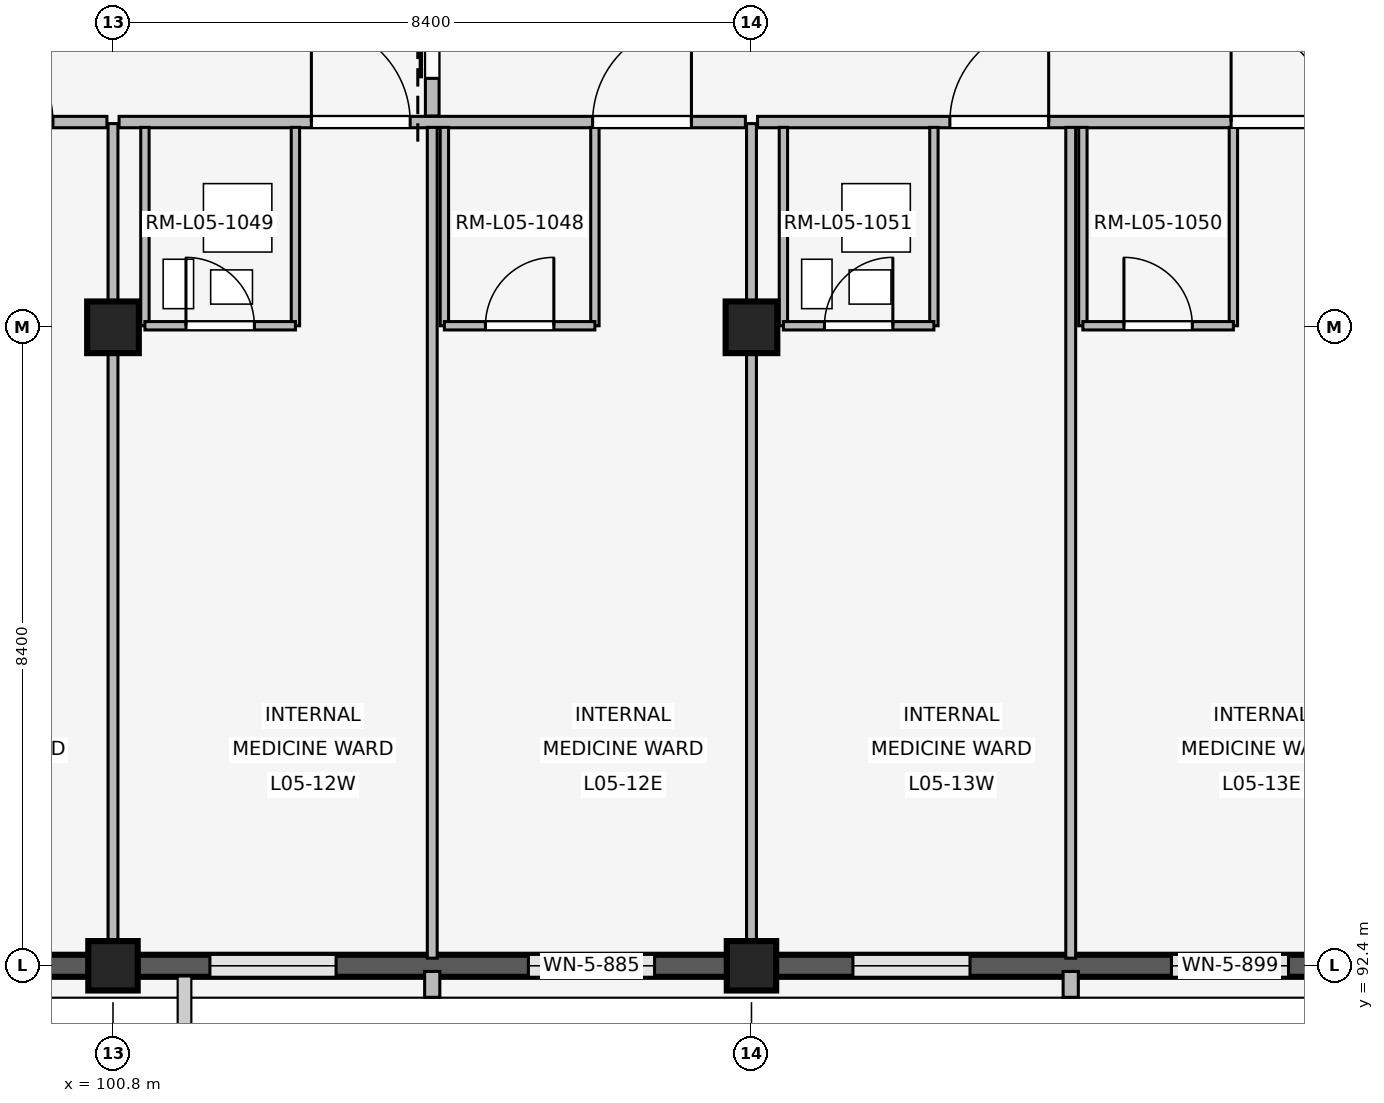
"""IFC4 building model, lengths in metres.
Left out: names, types, materials, properties, quantities, classifications, styles, units other than length and angle.
Written with IfcOpenShell. Run it as: python <this file> out.ifc"""

import sys

from ifc_helpers import new_model, si_unit, direction, frame, frame_2d, origin, origin_2d, place, context, subcontext, project, spatial, rectangle, extrude, element, fill, save


model = new_model("IFC4")
c1 = context("Model", 3, precision=1e-05, world=origin(), true_north=direction((0.0, 1.0)))
c2 = subcontext(c1, "Body", "Model", "MODEL_VIEW")
j1 = project(units=[si_unit("LENGTHUNIT", "METRE"), si_unit("PLANEANGLEUNIT", "RADIAN")], contexts=[c1])
p1 = place(None, origin())
s1 = spatial("IfcSite", under=j1, at=p1, CompositionType="ELEMENT")
p2 = place(p1, origin())
s2 = spatial("IfcBuilding", under=s1, at=p2, CompositionType="ELEMENT")
p3 = place(p2, frame((0.0, 0.0, 20.4)))
s3 = spatial("IfcBuildingStorey", under=s2, at=p3, CompositionType="ELEMENT", Elevation=20.4)
p4 = place(p3, frame((100.8, 92.4, 0.0), z_axis=(0.0, 0.0, 1.0), x_axis=(1.0, 0.0, 0.0)))
e1 = element("IfcColumn", 1, at=p4, inside=s3, PredefinedType="COLUMN", context=c2, shape_type="SweptSolid", body=[
    extrude(rectangle(XDim=0.65, YDim=0.65, at=origin_2d()), origin(), (0.0, 0.0, 1.0), 4.2),
])
p5 = place(p3, frame((100.8, 100.8, 0.0), z_axis=(0.0, 0.0, 1.0), x_axis=(1.0, 0.0, 0.0)))
e2 = element("IfcColumn", 2, at=p5, inside=s3, PredefinedType="COLUMN", context=c2, shape_type="SweptSolid", body=[
    extrude(rectangle(XDim=0.68, YDim=0.68, at=origin_2d()), origin(), (0.0, 0.0, 1.0), 4.2),
])
p6 = place(p3, frame((109.2, 92.4, 0.0), z_axis=(0.0, 0.0, 1.0), x_axis=(1.0, 0.0, 0.0)))
e3 = element("IfcColumn", 3, at=p6, inside=s3, PredefinedType="COLUMN", context=c2, shape_type="SweptSolid", body=[
    extrude(rectangle(XDim=0.65, YDim=0.65, at=origin_2d()), origin(), (0.0, 0.0, 1.0), 4.2),
])
p7 = place(p3, frame((109.2, 100.8, 0.0), z_axis=(0.0, 0.0, 1.0), x_axis=(1.0, 0.0, 0.0)))
e4 = element("IfcColumn", 4, at=p7, inside=s3, PredefinedType="COLUMN", context=c2, shape_type="SweptSolid", body=[
    extrude(rectangle(XDim=0.68, YDim=0.68, at=origin_2d()), origin(), (0.0, 0.0, 1.0), 4.2),
])
p8 = place(p3, frame((100.48, 92.4, 0.0), z_axis=(0.0, 0.0, 1.0), x_axis=(-1.0, 0.0, 0.0)))
e5 = element("IfcWall", 5, at=p8, inside=s3, PredefinedType="SOLIDWALL", context=c2, shape_type="SweptSolid", body=[
    extrude(rectangle(XDim=7.76, YDim=0.29, at=frame_2d((3.88, 0.0))), origin(), (0.0, 0.0, 1.0), 3.34),
])
p9 = place(p8, frame((1.075, 0.0, 0.85)))
e6 = element("IfcOpeningElement", 6, at=p9, cuts=e5, PredefinedType="OPENING", context=c2, shape_type="SweptSolid", body=[
    extrude(rectangle(XDim=1.42, YDim=1.45, at=frame_2d((0.71, 0.725))), frame((0.0, 0.155, 0.0), z_axis=(0.0, -1.0, 0.0), x_axis=(1.0, 0.0, 0.0)), (0.0, 0.0, 1.0), 0.31),
])
p10 = place(p8, frame((5.265, 0.0, 0.85)))
e7 = element("IfcOpeningElement", 7, at=p10, cuts=e5, PredefinedType="OPENING", context=c2, shape_type="SweptSolid", body=[
    extrude(rectangle(XDim=1.42, YDim=1.45, at=frame_2d((0.71, 0.725))), frame((0.0, 0.155, 0.0), z_axis=(0.0, -1.0, 0.0), x_axis=(1.0, 0.0, 0.0)), (0.0, 0.0, 1.0), 0.31),
])
p11 = place(p3, frame((108.88, 92.4, 0.0), z_axis=(0.0, 0.0, 1.0), x_axis=(-1.0, 0.0, 0.0)))
e8 = element("IfcWall", 8, at=p11, inside=s3, PredefinedType="SOLIDWALL", context=c2, shape_type="SweptSolid", body=[
    extrude(rectangle(XDim=7.76, YDim=0.29, at=frame_2d((3.88, 0.0))), origin(), (0.0, 0.0, 1.0), 3.34),
])
p12 = place(p11, frame((0.955, 0.0, 0.85)))
e9 = element("IfcOpeningElement", 9, at=p12, cuts=e8, PredefinedType="OPENING", context=c2, shape_type="SweptSolid", body=[
    extrude(rectangle(XDim=1.66, YDim=1.95, at=frame_2d((0.83, 0.975))), frame((0.0, 0.155, 0.0), z_axis=(0.0, -1.0, 0.0), x_axis=(1.0, 0.0, 0.0)), (0.0, 0.0, 1.0), 0.31),
])
p13 = place(p11, frame((5.145, 0.0, 0.85)))
e10 = element("IfcOpeningElement", 10, at=p13, cuts=e8, PredefinedType="OPENING", context=c2, shape_type="SweptSolid", body=[
    extrude(rectangle(XDim=1.66, YDim=1.95, at=frame_2d((0.83, 0.975))), frame((0.0, 0.155, 0.0), z_axis=(0.0, -1.0, 0.0), x_axis=(1.0, 0.0, 0.0)), (0.0, 0.0, 1.0), 0.31),
])
p14 = place(p3, frame((105.0, 92.325, 0.0), z_axis=(0.0, 0.0, 1.0), x_axis=(0.0, -1.0, 0.0)))
e11 = element("IfcWall", 11, at=p14, inside=s3, PredefinedType="ELEMENTEDWALL", context=c2, shape_type="SweptSolid", body=[
    extrude(rectangle(XDim=0.34, YDim=0.2, at=frame_2d((0.17, 0.0))), origin(), (0.0, 0.0, 1.0), 3.32),
])
p15 = place(p3, frame((117.28, 92.4, 0.0), z_axis=(0.0, 0.0, 1.0), x_axis=(-1.0, 0.0, 0.0)))
e12 = element("IfcWall", 12, at=p15, inside=s3, PredefinedType="SOLIDWALL", context=c2, shape_type="SweptSolid", body=[
    extrude(rectangle(XDim=7.76, YDim=0.29, at=frame_2d((3.88, 0.0))), origin(), (0.0, 0.0, 1.0), 3.34),
])
p16 = place(p15, frame((1.015, 0.0, 0.85)))
e13 = element("IfcOpeningElement", 13, at=p16, cuts=e12, PredefinedType="OPENING", context=c2, shape_type="SweptSolid", body=[
    extrude(rectangle(XDim=1.54, YDim=1.85, at=frame_2d((0.77, 0.925))), frame((0.0, 0.155, 0.0), z_axis=(0.0, -1.0, 0.0), x_axis=(1.0, 0.0, 0.0)), (0.0, 0.0, 1.0), 0.31),
])
p17 = place(p15, frame((5.205, 0.0, 0.85)))
e14 = element("IfcOpeningElement", 14, at=p17, cuts=e12, PredefinedType="OPENING", context=c2, shape_type="SweptSolid", body=[
    extrude(rectangle(XDim=1.54, YDim=1.85, at=frame_2d((0.77, 0.925))), frame((0.0, 0.155, 0.0), z_axis=(0.0, -1.0, 0.0), x_axis=(1.0, 0.0, 0.0)), (0.0, 0.0, 1.0), 0.31),
])
p18 = place(p3, frame((113.4, 92.325, 0.0), z_axis=(0.0, 0.0, 1.0), x_axis=(0.0, -1.0, 0.0)))
e15 = element("IfcWall", 15, at=p18, inside=s3, PredefinedType="ELEMENTEDWALL", context=c2, shape_type="SweptSolid", body=[
    extrude(rectangle(XDim=0.34, YDim=0.2, at=frame_2d((0.17, 0.0))), origin(), (0.0, 0.0, 1.0), 3.32),
])
p19 = place(p3, frame((92.76, 103.5, 0.0), z_axis=(0.0, 0.0, 1.0), x_axis=(1.0, 0.0, 0.0)))
e16 = element("IfcWall", 16, at=p19, inside=s3, PredefinedType="PARTITIONING", context=c2, shape_type="SweptSolid", body=[
    extrude(rectangle(XDim=7.96, YDim=0.15, at=frame_2d((3.98, 0.0))), origin(), (0.0, 0.0, 1.0), 3.32),
])
p20 = place(p19, frame((2.25, 0.0, 0.0)))
e17 = element("IfcOpeningElement", 17, at=p20, cuts=e16, PredefinedType="OPENING", context=c2, shape_type="SweptSolid", body=[
    extrude(rectangle(XDim=1.3, YDim=2.25, at=frame_2d((0.65, 1.125))), frame((0.0, 0.085, 0.0), z_axis=(0.0, -1.0, 0.0), x_axis=(1.0, 0.0, 0.0)), (0.0, 0.0, 1.0), 0.17),
])
p21 = place(p19, frame((5.95, 0.0, 0.0)))
e18 = element("IfcOpeningElement", 18, at=p21, cuts=e16, PredefinedType="OPENING", context=c2, shape_type="SweptSolid", body=[
    extrude(rectangle(XDim=1.3, YDim=2.25, at=frame_2d((0.65, 1.125))), frame((0.0, 0.085, 0.0), z_axis=(0.0, -1.0, 0.0), x_axis=(1.0, 0.0, 0.0)), (0.0, 0.0, 1.0), 0.17),
])
p22 = place(p3, frame((100.8, 92.54, 0.0), z_axis=(0.0, 0.0, 1.0), x_axis=(0.0, 1.0, 0.0)))
e19 = element("IfcWall", 19, at=p22, inside=s3, PredefinedType="PARTITIONING", context=c2, shape_type="SweptSolid", body=[
    extrude(rectangle(XDim=10.94, YDim=0.13, at=frame_2d((5.47, 0.0))), origin(), (0.0, 0.0, 1.0), 3.32),
])
p23 = place(p3, frame((100.88, 103.5, 0.0), z_axis=(0.0, 0.0, 1.0), x_axis=(1.0, 0.0, 0.0)))
e20 = element("IfcWall", 20, at=p23, inside=s3, PredefinedType="PARTITIONING", context=c2, shape_type="SweptSolid", body=[
    extrude(rectangle(XDim=8.24, YDim=0.15, at=frame_2d((4.12, 0.0))), origin(), (0.0, 0.0, 1.0), 3.32),
])
p24 = place(p23, frame((2.53, 0.0, 0.0)))
e21 = element("IfcOpeningElement", 21, at=p24, cuts=e20, PredefinedType="OPENING", context=c2, shape_type="SweptSolid", body=[
    extrude(rectangle(XDim=1.3, YDim=2.25, at=frame_2d((0.65, 1.125))), frame((0.0, 0.085, 0.0), z_axis=(0.0, -1.0, 0.0), x_axis=(1.0, 0.0, 0.0)), (0.0, 0.0, 1.0), 0.17),
])
p25 = place(p23, frame((6.23, 0.0, 0.0)))
e22 = element("IfcOpeningElement", 22, at=p25, cuts=e20, PredefinedType="OPENING", context=c2, shape_type="SweptSolid", body=[
    extrude(rectangle(XDim=1.3, YDim=2.25, at=frame_2d((0.65, 1.125))), frame((0.0, 0.085, 0.0), z_axis=(0.0, -1.0, 0.0), x_axis=(1.0, 0.0, 0.0)), (0.0, 0.0, 1.0), 0.17),
])
p26 = place(p3, frame((105.0, 92.5, 0.0), z_axis=(0.0, 0.0, 1.0), x_axis=(0.0, 1.0, 0.0)))
e23 = element("IfcWall", 23, at=p26, inside=s3, PredefinedType="PARTITIONING", context=c2, shape_type="SweptSolid", body=[
    extrude(rectangle(XDim=10.93, YDim=0.13, at=frame_2d((5.465, 0.0))), origin(), (0.0, 0.0, 1.0), 3.32),
])
for number, where, z_axis, x_axis in (
    (24, (101.22, 100.82, 0.0), (0.0, 0.0, 1.0), (0.0, 1.0, 0.0)),
    (25, (103.2, 100.82, 0.0), (0.0, 0.0, 1.0), (0.0, 1.0, 0.0)),
):
    element("IfcWall", number, at=place(p3, frame(where, z_axis=z_axis, x_axis=x_axis)), inside=s3, PredefinedType="PARTITIONING", context=c2, shape_type="SweptSolid", body=[
        extrude(rectangle(XDim=2.61, YDim=0.11, at=frame_2d((1.305, 0.0))), origin(), (0.0, 0.0, 1.0), 3.32),
    ])
p27 = place(p3, frame((101.22, 100.82, 0.0), z_axis=(0.0, 0.0, 1.0), x_axis=(1.0, 0.0, 0.0)))
e26 = element("IfcWall", 26, at=p27, inside=s3, PredefinedType="PARTITIONING", context=c2, shape_type="SweptSolid", body=[
    extrude(rectangle(XDim=1.98, YDim=0.11, at=frame_2d((0.99, 0.0))), origin(), (0.0, 0.0, 1.0), 3.32),
])
p28 = place(p27, frame((0.54, 0.0, 0.0)))
e27 = element("IfcOpeningElement", 27, at=p28, cuts=e26, PredefinedType="OPENING", context=c2, shape_type="SweptSolid", body=[
    extrude(rectangle(XDim=0.9, YDim=2.1, at=frame_2d((0.45, 1.05))), frame((0.0, 0.065, 0.0), z_axis=(0.0, -1.0, 0.0), x_axis=(1.0, 0.0, 0.0)), (0.0, 0.0, 1.0), 0.13),
])
for number, where, z_axis, x_axis in (
    (28, (105.16, 100.82, 0.0), (0.0, 0.0, 1.0), (0.0, 1.0, 0.0)),
    (29, (107.14, 100.82, 0.0), (0.0, 0.0, 1.0), (0.0, 1.0, 0.0)),
):
    element("IfcWall", number, at=place(p3, frame(where, z_axis=z_axis, x_axis=x_axis)), inside=s3, PredefinedType="PARTITIONING", context=c2, shape_type="SweptSolid", body=[
        extrude(rectangle(XDim=2.61, YDim=0.11, at=frame_2d((1.305, 0.0))), origin(), (0.0, 0.0, 1.0), 3.32),
    ])
p29 = place(p3, frame((105.16, 100.82, 0.0), z_axis=(0.0, 0.0, 1.0), x_axis=(1.0, 0.0, 0.0)))
e30 = element("IfcWall", 30, at=p29, inside=s3, PredefinedType="PARTITIONING", context=c2, shape_type="SweptSolid", body=[
    extrude(rectangle(XDim=1.98, YDim=0.11, at=frame_2d((0.99, 0.0))), origin(), (0.0, 0.0, 1.0), 3.32),
])
p30 = place(p29, frame((0.54, 0.0, 0.0)))
e31 = element("IfcOpeningElement", 31, at=p30, cuts=e30, PredefinedType="OPENING", context=c2, shape_type="SweptSolid", body=[
    extrude(rectangle(XDim=0.9, YDim=2.1, at=frame_2d((0.45, 1.05))), frame((0.0, 0.065, 0.0), z_axis=(0.0, -1.0, 0.0), x_axis=(1.0, 0.0, 0.0)), (0.0, 0.0, 1.0), 0.13),
])
p31 = place(p3, frame((105.0, 103.58, 0.0), z_axis=(0.0, 0.0, 1.0), x_axis=(0.0, 1.0, 0.0)))
e32 = element("IfcWall", 32, at=p31, inside=s3, PredefinedType="PARTITIONING", context=c2, shape_type="SweptSolid", body=[
    extrude(rectangle(XDim=2.84, YDim=0.18, at=frame_2d((1.42, 0.0))), origin(), (0.0, 0.0, 1.0), 3.32),
])
p32 = place(p31, frame((0.495, 0.0, 0.0)))
e33 = element("IfcOpeningElement", 33, at=p32, cuts=e32, PredefinedType="OPENING", context=c2, shape_type="SweptSolid", body=[
    extrude(rectangle(XDim=1.85, YDim=2.3, at=frame_2d((0.925, 1.15))), frame((0.0, 0.1, 0.0), z_axis=(0.0, -1.0, 0.0), x_axis=(1.0, 0.0, 0.0)), (0.0, 0.0, 1.0), 0.2),
])
p33 = place(p3, frame((109.2, 92.54, 0.0), z_axis=(0.0, 0.0, 1.0), x_axis=(0.0, 1.0, 0.0)))
e34 = element("IfcWall", 34, at=p33, inside=s3, PredefinedType="PARTITIONING", context=c2, shape_type="SweptSolid", body=[
    extrude(rectangle(XDim=10.94, YDim=0.13, at=frame_2d((5.47, 0.0))), origin(), (0.0, 0.0, 1.0), 3.32),
])
p34 = place(p3, frame((109.28, 103.5, 0.0), z_axis=(0.0, 0.0, 1.0), x_axis=(1.0, 0.0, 0.0)))
e35 = element("IfcWall", 35, at=p34, inside=s3, PredefinedType="PARTITIONING", context=c2, shape_type="SweptSolid", body=[
    extrude(rectangle(XDim=8.24, YDim=0.15, at=frame_2d((4.12, 0.0))), origin(), (0.0, 0.0, 1.0), 3.32),
])
p35 = place(p34, frame((2.53, 0.0, 0.0)))
e36 = element("IfcOpeningElement", 36, at=p35, cuts=e35, PredefinedType="OPENING", context=c2, shape_type="SweptSolid", body=[
    extrude(rectangle(XDim=1.3, YDim=2.25, at=frame_2d((0.65, 1.125))), frame((0.0, 0.085, 0.0), z_axis=(0.0, -1.0, 0.0), x_axis=(1.0, 0.0, 0.0)), (0.0, 0.0, 1.0), 0.17),
])
p36 = place(p34, frame((6.23, 0.0, 0.0)))
e37 = element("IfcOpeningElement", 37, at=p36, cuts=e35, PredefinedType="OPENING", context=c2, shape_type="SweptSolid", body=[
    extrude(rectangle(XDim=1.3, YDim=2.25, at=frame_2d((0.65, 1.125))), frame((0.0, 0.085, 0.0), z_axis=(0.0, -1.0, 0.0), x_axis=(1.0, 0.0, 0.0)), (0.0, 0.0, 1.0), 0.17),
])
p37 = place(p3, frame((113.4, 92.5, 0.0), z_axis=(0.0, 0.0, 1.0), x_axis=(0.0, 1.0, 0.0)))
e38 = element("IfcWall", 38, at=p37, inside=s3, PredefinedType="PARTITIONING", context=c2, shape_type="SweptSolid", body=[
    extrude(rectangle(XDim=10.93, YDim=0.13, at=frame_2d((5.465, 0.0))), origin(), (0.0, 0.0, 1.0), 3.32),
])
for number, where, z_axis, x_axis in (
    (39, (109.62, 100.82, 0.0), (0.0, 0.0, 1.0), (0.0, 1.0, 0.0)),
    (40, (111.6, 100.82, 0.0), (0.0, 0.0, 1.0), (0.0, 1.0, 0.0)),
):
    element("IfcWall", number, at=place(p3, frame(where, z_axis=z_axis, x_axis=x_axis)), inside=s3, PredefinedType="PARTITIONING", context=c2, shape_type="SweptSolid", body=[
        extrude(rectangle(XDim=2.61, YDim=0.11, at=frame_2d((1.305, 0.0))), origin(), (0.0, 0.0, 1.0), 3.32),
    ])
p38 = place(p3, frame((109.62, 100.82, 0.0), z_axis=(0.0, 0.0, 1.0), x_axis=(1.0, 0.0, 0.0)))
e41 = element("IfcWall", 41, at=p38, inside=s3, PredefinedType="PARTITIONING", context=c2, shape_type="SweptSolid", body=[
    extrude(rectangle(XDim=1.98, YDim=0.11, at=frame_2d((0.99, 0.0))), origin(), (0.0, 0.0, 1.0), 3.32),
])
p39 = place(p38, frame((0.54, 0.0, 0.0)))
e42 = element("IfcOpeningElement", 42, at=p39, cuts=e41, PredefinedType="OPENING", context=c2, shape_type="SweptSolid", body=[
    extrude(rectangle(XDim=0.9, YDim=2.1, at=frame_2d((0.45, 1.05))), frame((0.0, 0.065, 0.0), z_axis=(0.0, -1.0, 0.0), x_axis=(1.0, 0.0, 0.0)), (0.0, 0.0, 1.0), 0.13),
])
for number, where, z_axis, x_axis in (
    (43, (113.56, 100.82, 0.0), (0.0, 0.0, 1.0), (0.0, 1.0, 0.0)),
    (44, (115.54, 100.82, 0.0), (0.0, 0.0, 1.0), (0.0, 1.0, 0.0)),
):
    element("IfcWall", number, at=place(p3, frame(where, z_axis=z_axis, x_axis=x_axis)), inside=s3, PredefinedType="PARTITIONING", context=c2, shape_type="SweptSolid", body=[
        extrude(rectangle(XDim=2.61, YDim=0.11, at=frame_2d((1.305, 0.0))), origin(), (0.0, 0.0, 1.0), 3.32),
    ])
p40 = place(p3, frame((113.56, 100.82, 0.0), z_axis=(0.0, 0.0, 1.0), x_axis=(1.0, 0.0, 0.0)))
e45 = element("IfcWall", 45, at=p40, inside=s3, PredefinedType="PARTITIONING", context=c2, shape_type="SweptSolid", body=[
    extrude(rectangle(XDim=1.98, YDim=0.11, at=frame_2d((0.99, 0.0))), origin(), (0.0, 0.0, 1.0), 3.32),
])
p41 = place(p40, frame((0.54, 0.0, 0.0)))
e46 = element("IfcOpeningElement", 46, at=p41, cuts=e45, PredefinedType="OPENING", context=c2, shape_type="SweptSolid", body=[
    extrude(rectangle(XDim=0.9, YDim=2.1, at=frame_2d((0.45, 1.05))), frame((0.0, 0.065, 0.0), z_axis=(0.0, -1.0, 0.0), x_axis=(1.0, 0.0, 0.0)), (0.0, 0.0, 1.0), 0.13),
])
p42 = place(p12, origin())
e47 = element("IfcWindow", 47, at=p42, inside=s3, PartitioningType="SINGLE_PANEL", PredefinedType="WINDOW", context=c2, shape_type="SweptSolid", body=[
    extrude(rectangle(XDim=1.66, YDim=1.95, at=frame_2d((0.83, 0.975))), frame((0.0, 0.03, 0.0), z_axis=(0.0, -1.0, 0.0), x_axis=(1.0, 0.0, 0.0)), (0.0, 0.0, 1.0), 0.06),
])
fill(e9, e47)
p43 = place(p13, origin())
e48 = element("IfcWindow", 48, at=p43, inside=s3, PartitioningType="SINGLE_PANEL", PredefinedType="WINDOW", context=c2, shape_type="SweptSolid", body=[
    extrude(rectangle(XDim=1.66, YDim=1.95, at=frame_2d((0.83, 0.975))), frame((0.0, 0.03, 0.0), z_axis=(0.0, -1.0, 0.0), x_axis=(1.0, 0.0, 0.0)), (0.0, 0.0, 1.0), 0.06),
])
fill(e10, e48)
p44 = place(p16, origin())
e49 = element("IfcWindow", 49, at=p44, inside=s3, PartitioningType="SINGLE_PANEL", PredefinedType="WINDOW", context=c2, shape_type="SweptSolid", body=[
    extrude(rectangle(XDim=1.54, YDim=1.85, at=frame_2d((0.77, 0.925))), frame((0.0, 0.03, 0.0), z_axis=(0.0, -1.0, 0.0), x_axis=(1.0, 0.0, 0.0)), (0.0, 0.0, 1.0), 0.06),
])
fill(e13, e49)
p45 = place(p17, origin())
e50 = element("IfcWindow", 50, at=p45, inside=s3, PartitioningType="SINGLE_PANEL", PredefinedType="WINDOW", context=c2, shape_type="SweptSolid", body=[
    extrude(rectangle(XDim=1.54, YDim=1.85, at=frame_2d((0.77, 0.925))), frame((0.0, 0.03, 0.0), z_axis=(0.0, -1.0, 0.0), x_axis=(1.0, 0.0, 0.0)), (0.0, 0.0, 1.0), 0.06),
])
fill(e14, e50)
p46 = place(p21, origin())
e51 = element("IfcDoor", 51, at=p46, inside=s3, OperationType="SINGLE_SWING_LEFT", PredefinedType="DOOR", context=c2, shape_type="SweptSolid", body=[
    extrude(rectangle(XDim=1.3, YDim=2.25, at=frame_2d((0.65, 1.125))), frame((0.0, 0.025, 0.0), z_axis=(0.0, -1.0, 0.0), x_axis=(1.0, 0.0, 0.0)), (0.0, 0.0, 1.0), 0.05),
])
fill(e18, e51)
p47 = place(p24, origin())
e52 = element("IfcDoor", 52, at=p47, inside=s3, OperationType="SINGLE_SWING_LEFT", PredefinedType="DOOR", context=c2, shape_type="SweptSolid", body=[
    extrude(rectangle(XDim=1.3, YDim=2.25, at=frame_2d((0.65, 1.125))), frame((0.0, 0.025, 0.0), z_axis=(0.0, -1.0, 0.0), x_axis=(1.0, 0.0, 0.0)), (0.0, 0.0, 1.0), 0.05),
])
fill(e21, e52)
p48 = place(p25, origin())
e53 = element("IfcDoor", 53, at=p48, inside=s3, OperationType="SINGLE_SWING_RIGHT", PredefinedType="DOOR", context=c2, shape_type="SweptSolid", body=[
    extrude(rectangle(XDim=1.3, YDim=2.25, at=frame_2d((0.65, 1.125))), frame((0.0, 0.025, 0.0), z_axis=(0.0, -1.0, 0.0), x_axis=(1.0, 0.0, 0.0)), (0.0, 0.0, 1.0), 0.05),
])
fill(e22, e53)
p49 = place(p28, origin())
e54 = element("IfcDoor", 54, at=p49, inside=s3, OperationType="SINGLE_SWING_LEFT", PredefinedType="DOOR", context=c2, shape_type="SweptSolid", body=[
    extrude(rectangle(XDim=0.9, YDim=2.1, at=frame_2d((0.45, 1.05))), frame((0.0, 0.025, 0.0), z_axis=(0.0, -1.0, 0.0), x_axis=(1.0, 0.0, 0.0)), (0.0, 0.0, 1.0), 0.05),
])
fill(e27, e54)
p50 = place(p30, origin())
e55 = element("IfcDoor", 55, at=p50, inside=s3, OperationType="SINGLE_SWING_RIGHT", PredefinedType="DOOR", context=c2, shape_type="SweptSolid", body=[
    extrude(rectangle(XDim=0.9, YDim=2.1, at=frame_2d((0.45, 1.05))), frame((0.0, 0.025, 0.0), z_axis=(0.0, -1.0, 0.0), x_axis=(1.0, 0.0, 0.0)), (0.0, 0.0, 1.0), 0.05),
])
fill(e31, e55)
p51 = place(p32, origin())
e56 = element("IfcDoor", 56, at=p51, inside=s3, OperationType="SLIDING_TO_LEFT", PredefinedType="DOOR", context=c2, shape_type="SweptSolid", body=[
    extrude(rectangle(XDim=1.85, YDim=2.3, at=frame_2d((0.925, 1.15))), frame((0.0, 0.025, 0.0), z_axis=(0.0, -1.0, 0.0), x_axis=(1.0, 0.0, 0.0)), (0.0, 0.0, 1.0), 0.05),
])
fill(e33, e56)
p52 = place(p35, origin())
e57 = element("IfcDoor", 57, at=p52, inside=s3, OperationType="SINGLE_SWING_RIGHT", PredefinedType="DOOR", context=c2, shape_type="SweptSolid", body=[
    extrude(rectangle(XDim=1.3, YDim=2.25, at=frame_2d((0.65, 1.125))), frame((0.0, 0.025, 0.0), z_axis=(0.0, -1.0, 0.0), x_axis=(1.0, 0.0, 0.0)), (0.0, 0.0, 1.0), 0.05),
])
fill(e36, e57)
p53 = place(p36, origin())
e58 = element("IfcDoor", 58, at=p53, inside=s3, OperationType="SINGLE_SWING_LEFT", PredefinedType="DOOR", context=c2, shape_type="SweptSolid", body=[
    extrude(rectangle(XDim=1.3, YDim=2.25, at=frame_2d((0.65, 1.125))), frame((0.0, 0.025, 0.0), z_axis=(0.0, -1.0, 0.0), x_axis=(1.0, 0.0, 0.0)), (0.0, 0.0, 1.0), 0.05),
])
fill(e37, e58)
p54 = place(p39, origin())
e59 = element("IfcDoor", 59, at=p54, inside=s3, OperationType="SINGLE_SWING_RIGHT", PredefinedType="DOOR", context=c2, shape_type="SweptSolid", body=[
    extrude(rectangle(XDim=0.9, YDim=2.1, at=frame_2d((0.45, 1.05))), frame((0.0, 0.025, 0.0), z_axis=(0.0, -1.0, 0.0), x_axis=(1.0, 0.0, 0.0)), (0.0, 0.0, 1.0), 0.05),
])
fill(e42, e59)
p55 = place(p41, origin())
e60 = element("IfcDoor", 60, at=p55, inside=s3, OperationType="SINGLE_SWING_LEFT", PredefinedType="DOOR", context=c2, shape_type="SweptSolid", body=[
    extrude(rectangle(XDim=0.9, YDim=2.1, at=frame_2d((0.45, 1.05))), frame((0.0, 0.025, 0.0), z_axis=(0.0, -1.0, 0.0), x_axis=(1.0, 0.0, 0.0)), (0.0, 0.0, 1.0), 0.05),
])
fill(e46, e60)
save(model, sys.argv[1])
